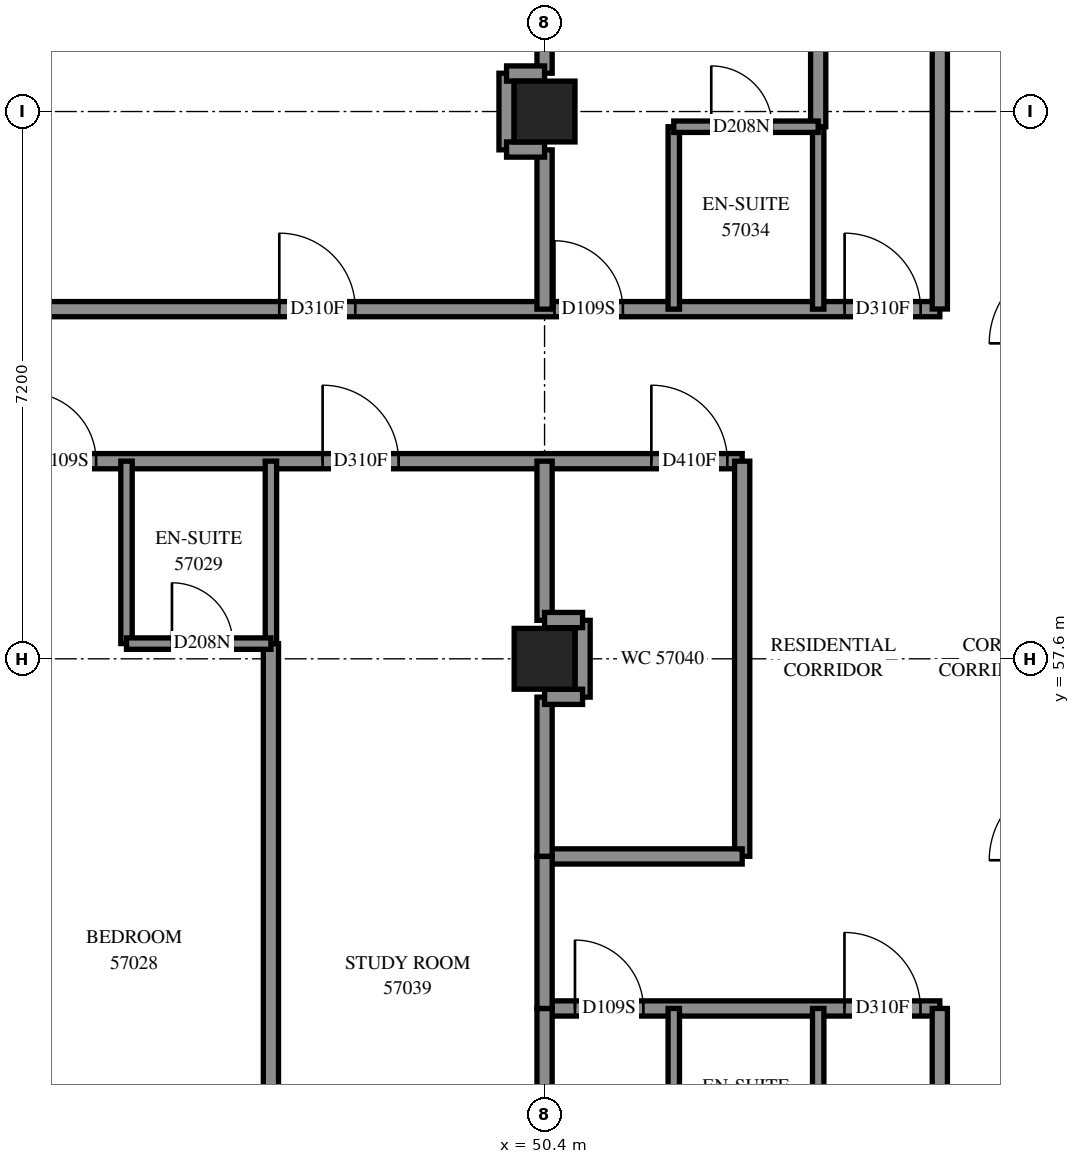
"""IFC4 building model, lengths in metres.
Left out: names, types, materials, properties, quantities, classifications, styles, units other than length and angle.
Written with IfcOpenShell. Run it as: python <this file> out.ifc"""

import sys

from ifc_helpers import new_model, si_unit, direction, frame, frame_2d, origin, origin_2d, place, context, subcontext, project, spatial, rectangle, extrude, element, fill, save


model = new_model("IFC4")
c1 = context("Model", 3, precision=1e-05, world=origin(), true_north=direction((0.0, 1.0)))
c2 = subcontext(c1, "Body", "Model", "MODEL_VIEW")
j1 = project(units=[si_unit("LENGTHUNIT", "METRE"), si_unit("PLANEANGLEUNIT", "RADIAN")], contexts=[c1])
p1 = place(None, origin())
s1 = spatial("IfcSite", under=j1, at=p1, CompositionType="ELEMENT")
p2 = place(p1, origin())
s2 = spatial("IfcBuilding", under=s1, at=p2, CompositionType="ELEMENT")
p3 = place(p2, frame((0.0, 0.0, 210.0)))
s3 = spatial("IfcBuildingStorey", under=s2, at=p3, CompositionType="ELEMENT", Elevation=210.0)
for number, where, z_axis, x_axis in (
    (1, (50.4, 57.6, 0.0), (0.0, 0.0, 1.0), (1.0, 0.0, 0.0)),
    (2, (50.4, 64.8, 0.0), (0.0, 0.0, 1.0), (1.0, 0.0, 0.0)),
):
    element("IfcColumn", number, at=place(p3, frame(where, z_axis=z_axis, x_axis=x_axis)), inside=s3, PredefinedType="COLUMN", context=c2, shape_type="SweptSolid", body=[
        extrude(rectangle(XDim=0.8, YDim=0.8, at=origin_2d()), origin(), (0.0, 0.0, 1.0), 3.1),
    ])
p4 = place(p3, frame((36.0, 60.2, 0.0), z_axis=(0.0, 0.0, 1.0), x_axis=(1.0, 0.0, 0.0)))
e3 = element("IfcWall", 3, at=p4, inside=s3, PredefinedType="PARTITIONING", context=c2, shape_type="SweptSolid", body=[
    extrude(rectangle(XDim=17.0, YDim=0.2, at=frame_2d((8.5, 0.0))), origin(), (0.0, 0.0, 1.0), 3.1),
])
p5 = place(p4, frame((4.125, 0.0, 0.0)))
e4 = element("IfcOpeningElement", 4, at=p5, cuts=e3, PredefinedType="OPENING", context=c2, shape_type="SweptSolid", body=[
    extrude(rectangle(XDim=1.0, YDim=2.1, at=frame_2d((0.5, 1.05))), frame((0.0, 0.11, 0.0), z_axis=(0.0, -1.0, 0.0), x_axis=(1.0, 0.0, 0.0)), (0.0, 0.0, 1.0), 0.22),
])
p6 = place(p4, frame((7.6, 0.0, 0.0)))
e5 = element("IfcOpeningElement", 5, at=p6, cuts=e3, PredefinedType="OPENING", context=c2, shape_type="SweptSolid", body=[
    extrude(rectangle(XDim=0.9, YDim=2.1, at=frame_2d((0.45, 1.05))), frame((0.0, 0.11, 0.0), z_axis=(0.0, -1.0, 0.0), x_axis=(1.0, 0.0, 0.0)), (0.0, 0.0, 1.0), 0.22),
])
p7 = place(p4, frame((11.48, 0.0, 0.0)))
e6 = element("IfcOpeningElement", 6, at=p7, cuts=e3, PredefinedType="OPENING", context=c2, shape_type="SweptSolid", body=[
    extrude(rectangle(XDim=1.0, YDim=2.1, at=frame_2d((0.5, 1.05))), frame((0.0, 0.11, 0.0), z_axis=(0.0, -1.0, 0.0), x_axis=(1.0, 0.0, 0.0)), (0.0, 0.0, 1.0), 0.22),
])
p8 = place(p4, frame((15.805, 0.0, 0.0)))
e7 = element("IfcOpeningElement", 7, at=p8, cuts=e3, PredefinedType="OPENING", context=c2, shape_type="SweptSolid", body=[
    extrude(rectangle(XDim=1.0, YDim=2.1, at=frame_2d((0.5, 1.05))), frame((0.0, 0.11, 0.0), z_axis=(0.0, -1.0, 0.0), x_axis=(1.0, 0.0, 0.0)), (0.0, 0.0, 1.0), 0.22),
])
p9 = place(p3, frame((40.602, 62.2, 0.0), z_axis=(0.0, 0.0, 1.0), x_axis=(1.0, 0.0, 0.0)))
e8 = element("IfcWall", 8, at=p9, inside=s3, PredefinedType="PARTITIONING", context=c2, shape_type="SweptSolid", body=[
    extrude(rectangle(XDim=14.998, YDim=0.2, at=frame_2d((7.499, 0.0))), origin(), (0.0, 0.0, 1.0), 3.1),
])
p10 = place(p9, frame((6.308, 0.0, 0.0)))
e9 = element("IfcOpeningElement", 9, at=p10, cuts=e8, PredefinedType="OPENING", context=c2, shape_type="SweptSolid", body=[
    extrude(rectangle(XDim=1.0, YDim=2.1, at=frame_2d((0.5, 1.05))), frame((0.0, 0.11, 0.0), z_axis=(0.0, -1.0, 0.0), x_axis=(1.0, 0.0, 0.0)), (0.0, 0.0, 1.0), 0.22),
])
p11 = place(p9, frame((9.928, 0.0, 0.0)))
e10 = element("IfcOpeningElement", 10, at=p11, cuts=e8, PredefinedType="OPENING", context=c2, shape_type="SweptSolid", body=[
    extrude(rectangle(XDim=0.9, YDim=2.1, at=frame_2d((0.45, 1.05))), frame((0.0, 0.11, 0.0), z_axis=(0.0, -1.0, 0.0), x_axis=(1.0, 0.0, 0.0)), (0.0, 0.0, 1.0), 0.22),
])
p12 = place(p9, frame((13.746, 0.0, 0.0)))
e11 = element("IfcOpeningElement", 11, at=p12, cuts=e8, PredefinedType="OPENING", context=c2, shape_type="SweptSolid", body=[
    extrude(rectangle(XDim=1.0, YDim=2.1, at=frame_2d((0.5, 1.05))), frame((0.0, 0.11, 0.0), z_axis=(0.0, -1.0, 0.0), x_axis=(1.0, 0.0, 0.0)), (0.0, 0.0, 1.0), 0.22),
])
p13 = place(p3, frame((54.0, 64.6, 0.0), z_axis=(0.0, 0.0, 1.0), x_axis=(0.0, 1.0, 0.0)))
e12 = element("IfcWall", 12, at=p13, inside=s3, PredefinedType="PARTITIONING", context=c2, shape_type="SweptSolid", body=[
    extrude(rectangle(XDim=8.18, YDim=0.2, at=frame_2d((4.09, 0.0))), origin(), (0.0, 0.0, 1.0), 3.1),
])
p14 = place(p3, frame((46.8, 49.7, 0.0), z_axis=(0.0, 0.0, 1.0), x_axis=(0.0, 1.0, 0.0)))
e13 = element("IfcWall", 13, at=p14, inside=s3, PredefinedType="PARTITIONING", context=c2, shape_type="SweptSolid", body=[
    extrude(rectangle(XDim=8.1, YDim=0.2, at=frame_2d((4.05, 0.0))), origin(), (0.0, 0.0, 1.0), 3.1),
])
p15 = place(p3, frame((50.4, 65.304, 0.0), z_axis=(0.0, 0.0, 1.0), x_axis=(0.0, 1.0, 0.0)))
e14 = element("IfcWall", 14, at=p15, inside=s3, PredefinedType="PARTITIONING", context=c2, shape_type="SweptSolid", body=[
    extrude(rectangle(XDim=6.192, YDim=0.2, at=frame_2d((3.096, 0.0))), origin(), (0.0, 0.0, 1.0), 3.1),
])
p16 = place(p3, frame((50.4, 53.0, 0.0), z_axis=(0.0, 0.0, 1.0), x_axis=(1.0, 0.0, 0.0)))
e15 = element("IfcWall", 15, at=p16, inside=s3, PredefinedType="PARTITIONING", context=c2, shape_type="SweptSolid", body=[
    extrude(rectangle(XDim=5.2, YDim=0.2, at=frame_2d((2.6, 0.0))), origin(), (0.0, 0.0, 1.0), 3.1),
])
p17 = place(p16, frame((0.4, 0.0, 0.0)))
e16 = element("IfcOpeningElement", 16, at=p17, cuts=e15, PredefinedType="OPENING", context=c2, shape_type="SweptSolid", body=[
    extrude(rectangle(XDim=0.9, YDim=2.1, at=frame_2d((0.45, 1.05))), frame((0.0, 0.11, 0.0), z_axis=(0.0, -1.0, 0.0), x_axis=(1.0, 0.0, 0.0)), (0.0, 0.0, 1.0), 0.22),
])
p18 = place(p16, frame((3.946, 0.0, 0.0)))
e17 = element("IfcOpeningElement", 17, at=p18, cuts=e15, PredefinedType="OPENING", context=c2, shape_type="SweptSolid", body=[
    extrude(rectangle(XDim=1.0, YDim=2.1, at=frame_2d((0.5, 1.05))), frame((0.0, 0.11, 0.0), z_axis=(0.0, -1.0, 0.0), x_axis=(1.0, 0.0, 0.0)), (0.0, 0.0, 1.0), 0.22),
])
p19 = place(p3, frame((53.0, 55.002, 0.0), z_axis=(0.0, 0.0, 1.0), x_axis=(0.0, 1.0, 0.0)))
e18 = element("IfcWall", 18, at=p19, inside=s3, PredefinedType="PARTITIONING", context=c2, shape_type="SweptSolid", body=[
    extrude(rectangle(XDim=5.198, YDim=0.2, at=frame_2d((2.599, 0.0))), origin(), (0.0, 0.0, 1.0), 3.1),
])
p20 = place(p3, frame((55.6, 48.4, 0.0), z_axis=(0.0, 0.0, 1.0), x_axis=(0.0, 1.0, 0.0)))
e19 = element("IfcWall", 19, at=p20, inside=s3, PredefinedType="PARTITIONING", context=c2, shape_type="SweptSolid", body=[
    extrude(rectangle(XDim=4.6, YDim=0.2, at=frame_2d((2.3, 0.0))), origin(), (0.0, 0.0, 1.0), 3.1),
])
p21 = place(p3, frame((55.6, 62.202, 0.0), z_axis=(0.0, 0.0, 1.0), x_axis=(0.0, 1.0, 0.0)))
e20 = element("IfcWall", 20, at=p21, inside=s3, PredefinedType="PARTITIONING", context=c2, shape_type="SweptSolid", body=[
    extrude(rectangle(XDim=4.598, YDim=0.2, at=frame_2d((2.299, 0.0))), origin(), (0.0, 0.0, 1.0), 3.1),
])
p22 = place(p3, frame((50.4, 55.0, 0.0), z_axis=(0.0, 0.0, 1.0), x_axis=(1.0, 0.0, 0.0)))
e21 = element("IfcWall", 21, at=p22, inside=s3, PredefinedType="PARTITIONING", context=c2, shape_type="SweptSolid", body=[
    extrude(rectangle(XDim=2.6, YDim=0.2, at=frame_2d((1.3, 0.0))), origin(), (0.0, 0.0, 1.0), 3.1),
])
for number, where, z_axis, x_axis in (
    (22, (44.9, 57.8, 0.0), (0.0, 0.0, 1.0), (0.0, 1.0, 0.0)),
    (23, (46.8, 57.8, 0.0), (0.0, 0.0, 1.0), (0.0, 1.0, 0.0)),
    (24, (52.1, 50.6, 0.0), (0.0, 0.0, 1.0), (0.0, 1.0, 0.0)),
    (25, (54.0, 50.6, 0.0), (0.0, 0.0, 1.0), (0.0, 1.0, 0.0)),
    (26, (52.1, 62.2, 0.0), (0.0, 0.0, 1.0), (0.0, 1.0, 0.0)),
    (27, (54.0, 62.2, 0.0), (0.0, 0.0, 1.0), (0.0, 1.0, 0.0)),
):
    element("IfcWall", number, at=place(p3, frame(where, z_axis=z_axis, x_axis=x_axis)), inside=s3, PredefinedType="PARTITIONING", context=c2, shape_type="SweptSolid", body=[
        extrude(rectangle(XDim=2.4, YDim=0.15, at=frame_2d((1.2, 0.0))), origin(), (0.0, 0.0, 1.0), 3.1),
    ])
p23 = place(p3, frame((50.4, 50.8, 0.0), z_axis=(0.0, 0.0, 1.0), x_axis=(0.0, 1.0, 0.0)))
e28 = element("IfcWall", 28, at=p23, inside=s3, PredefinedType="PARTITIONING", context=c2, shape_type="SweptSolid", body=[
    extrude(rectangle(XDim=2.2, YDim=0.2, at=frame_2d((1.1, 0.0))), origin(), (0.0, 0.0, 1.0), 3.1),
])
for number, where, z_axis, x_axis in (
    (29, (50.4, 62.2, 0.0), (0.0, 0.0, 1.0), (0.0, 1.0, 0.0)),
    (30, (50.4, 55.0, 0.0), (0.0, 0.0, 1.0), (0.0, 1.0, 0.0)),
):
    element("IfcWall", number, at=place(p3, frame(where, z_axis=z_axis, x_axis=x_axis)), inside=s3, PredefinedType="PARTITIONING", context=c2, shape_type="SweptSolid", body=[
        extrude(rectangle(XDim=2.096, YDim=0.2, at=frame_2d((1.048, 0.0))), origin(), (0.0, 0.0, 1.0), 3.1),
    ])
p24 = place(p3, frame((50.4, 58.106, 0.0), z_axis=(0.0, 0.0, 1.0), x_axis=(0.0, 1.0, 0.0)))
e31 = element("IfcWall", 31, at=p24, inside=s3, PredefinedType="PARTITIONING", context=c2, shape_type="SweptSolid", body=[
    extrude(rectangle(XDim=2.094, YDim=0.2, at=frame_2d((1.047, 0.0))), origin(), (0.0, 0.0, 1.0), 3.1),
])
p25 = place(p3, frame((50.4, 53.0, 0.0), z_axis=(0.0, 0.0, 1.0), x_axis=(0.0, 1.0, 0.0)))
e32 = element("IfcWall", 32, at=p25, inside=s3, PredefinedType="PARTITIONING", context=c2, shape_type="SweptSolid", body=[
    extrude(rectangle(XDim=2.0, YDim=0.2, at=frame_2d((1.0, 0.0))), origin(), (0.0, 0.0, 1.0), 3.1),
])
p26 = place(p3, frame((52.1, 64.6, 0.0), z_axis=(0.0, 0.0, 1.0), x_axis=(1.0, 0.0, 0.0)))
e33 = element("IfcWall", 33, at=p26, inside=s3, PredefinedType="PARTITIONING", context=c2, shape_type="SweptSolid", body=[
    extrude(rectangle(XDim=1.9, YDim=0.15, at=frame_2d((0.95, 0.0))), origin(), (0.0, 0.0, 1.0), 3.1),
])
p27 = place(p26, frame((0.493, 0.0, 0.0)))
e34 = element("IfcOpeningElement", 34, at=p27, cuts=e33, PredefinedType="OPENING", context=c2, shape_type="SweptSolid", body=[
    extrude(rectangle(XDim=0.8, YDim=2.1, at=frame_2d((0.4, 1.05))), frame((0.0, 0.085, 0.0), z_axis=(0.0, -1.0, 0.0), x_axis=(1.0, 0.0, 0.0)), (0.0, 0.0, 1.0), 0.17),
])
p28 = place(p3, frame((44.9, 57.8, 0.0), z_axis=(0.0, 0.0, 1.0), x_axis=(1.0, 0.0, 0.0)))
e35 = element("IfcWall", 35, at=p28, inside=s3, PredefinedType="PARTITIONING", context=c2, shape_type="SweptSolid", body=[
    extrude(rectangle(XDim=1.9, YDim=0.15, at=frame_2d((0.95, 0.0))), origin(), (0.0, 0.0, 1.0), 3.1),
])
p29 = place(p28, frame((0.598, 0.0, 0.0)))
e36 = element("IfcOpeningElement", 36, at=p29, cuts=e35, PredefinedType="OPENING", context=c2, shape_type="SweptSolid", body=[
    extrude(rectangle(XDim=0.8, YDim=2.1, at=frame_2d((0.4, 1.05))), frame((0.0, 0.085, 0.0), z_axis=(0.0, -1.0, 0.0), x_axis=(1.0, 0.0, 0.0)), (0.0, 0.0, 1.0), 0.17),
])
p30 = place(p3, frame((50.9, 57.096, 0.0), z_axis=(0.0, 0.0, 1.0), x_axis=(0.0, 1.0, 0.0)))
e37 = element("IfcWall", 37, at=p30, inside=s3, PredefinedType="PARTITIONING", context=c2, shape_type="SweptSolid", body=[
    extrude(rectangle(XDim=1.01, YDim=0.2, at=frame_2d((0.505, 0.0))), origin(), (0.0, 0.0, 1.0), 3.1),
])
p31 = place(p3, frame((49.9, 64.296, 0.0), z_axis=(0.0, 0.0, 1.0), x_axis=(0.0, 1.0, 0.0)))
e38 = element("IfcWall", 38, at=p31, inside=s3, PredefinedType="PARTITIONING", context=c2, shape_type="SweptSolid", body=[
    extrude(rectangle(XDim=1.008, YDim=0.2, at=frame_2d((0.504, 0.0))), origin(), (0.0, 0.0, 1.0), 3.1),
])
for number, where, z_axis, x_axis in (
    (39, (49.9, 65.3, 0.0), (0.0, 0.0, 1.0), (1.0, 0.0, 0.0)),
    (40, (49.9, 64.3, 0.0), (0.0, 0.0, 1.0), (1.0, 0.0, 0.0)),
    (41, (50.4, 58.11, 0.0), (0.0, 0.0, 1.0), (1.0, 0.0, 0.0)),
    (42, (50.4, 57.1, 0.0), (0.0, 0.0, 1.0), (1.0, 0.0, 0.0)),
):
    element("IfcWall", number, at=place(p3, frame(where, z_axis=z_axis, x_axis=x_axis)), inside=s3, PredefinedType="PARTITIONING", context=c2, shape_type="SweptSolid", body=[
        extrude(rectangle(XDim=0.5, YDim=0.2, at=frame_2d((0.25, 0.0))), origin(), (0.0, 0.0, 1.0), 3.1),
    ])
p32 = place(p6, origin())
e43 = element("IfcDoor", 43, at=p32, inside=s3, OperationType="SINGLE_SWING_LEFT", PredefinedType="DOOR", context=c2, shape_type="SweptSolid", body=[
    extrude(rectangle(XDim=0.9, YDim=2.1, at=frame_2d((0.45, 1.05))), frame((0.0, 0.025, 0.0), z_axis=(0.0, -1.0, 0.0), x_axis=(1.0, 0.0, 0.0)), (0.0, 0.0, 1.0), 0.05),
])
fill(e5, e43)
p33 = place(p29, origin())
e44 = element("IfcDoor", 44, at=p33, inside=s3, OperationType="SINGLE_SWING_RIGHT", PredefinedType="DOOR", context=c2, shape_type="SweptSolid", body=[
    extrude(rectangle(XDim=0.8, YDim=2.1, at=frame_2d((0.4, 1.05))), frame((0.0, 0.025, 0.0), z_axis=(0.0, -1.0, 0.0), x_axis=(1.0, 0.0, 0.0)), (0.0, 0.0, 1.0), 0.05),
])
fill(e36, e44)
p34 = place(p10, origin())
e45 = element("IfcDoor", 45, at=p34, inside=s3, OperationType="SINGLE_SWING_RIGHT", PredefinedType="DOOR", context=c2, shape_type="SweptSolid", body=[
    extrude(rectangle(XDim=1.0, YDim=2.1, at=frame_2d((0.5, 1.05))), frame((0.0, 0.025, 0.0), z_axis=(0.0, -1.0, 0.0), x_axis=(1.0, 0.0, 0.0)), (0.0, 0.0, 1.0), 0.05),
])
fill(e9, e45)
p35 = place(p11, origin())
e46 = element("IfcDoor", 46, at=p35, inside=s3, OperationType="SINGLE_SWING_RIGHT", PredefinedType="DOOR", context=c2, shape_type="SweptSolid", body=[
    extrude(rectangle(XDim=0.9, YDim=2.1, at=frame_2d((0.45, 1.05))), frame((0.0, 0.025, 0.0), z_axis=(0.0, -1.0, 0.0), x_axis=(1.0, 0.0, 0.0)), (0.0, 0.0, 1.0), 0.05),
])
fill(e10, e46)
p36 = place(p27, origin())
e47 = element("IfcDoor", 47, at=p36, inside=s3, OperationType="SINGLE_SWING_RIGHT", PredefinedType="DOOR", context=c2, shape_type="SweptSolid", body=[
    extrude(rectangle(XDim=0.8, YDim=2.1, at=frame_2d((0.4, 1.05))), frame((0.0, 0.025, 0.0), z_axis=(0.0, -1.0, 0.0), x_axis=(1.0, 0.0, 0.0)), (0.0, 0.0, 1.0), 0.05),
])
fill(e34, e47)
p37 = place(p12, origin())
e48 = element("IfcDoor", 48, at=p37, inside=s3, OperationType="SINGLE_SWING_LEFT", PredefinedType="DOOR", context=c2, shape_type="SweptSolid", body=[
    extrude(rectangle(XDim=1.0, YDim=2.1, at=frame_2d((0.5, 1.05))), frame((0.0, 0.025, 0.0), z_axis=(0.0, -1.0, 0.0), x_axis=(1.0, 0.0, 0.0)), (0.0, 0.0, 1.0), 0.05),
])
fill(e11, e48)
p38 = place(p7, origin())
e49 = element("IfcDoor", 49, at=p38, inside=s3, OperationType="SINGLE_SWING_RIGHT", PredefinedType="DOOR", context=c2, shape_type="SweptSolid", body=[
    extrude(rectangle(XDim=1.0, YDim=2.1, at=frame_2d((0.5, 1.05))), frame((0.0, 0.025, 0.0), z_axis=(0.0, -1.0, 0.0), x_axis=(1.0, 0.0, 0.0)), (0.0, 0.0, 1.0), 0.05),
])
fill(e6, e49)
p39 = place(p8, origin())
e50 = element("IfcDoor", 50, at=p39, inside=s3, OperationType="SINGLE_SWING_LEFT", PredefinedType="DOOR", context=c2, shape_type="SweptSolid", body=[
    extrude(rectangle(XDim=1.0, YDim=2.1, at=frame_2d((0.5, 1.05))), frame((0.0, 0.025, 0.0), z_axis=(0.0, -1.0, 0.0), x_axis=(1.0, 0.0, 0.0)), (0.0, 0.0, 1.0), 0.05),
])
fill(e7, e50)
p40 = place(p17, origin())
e51 = element("IfcDoor", 51, at=p40, inside=s3, OperationType="SINGLE_SWING_LEFT", PredefinedType="DOOR", context=c2, shape_type="SweptSolid", body=[
    extrude(rectangle(XDim=0.9, YDim=2.1, at=frame_2d((0.45, 1.05))), frame((0.0, 0.025, 0.0), z_axis=(0.0, -1.0, 0.0), x_axis=(1.0, 0.0, 0.0)), (0.0, 0.0, 1.0), 0.05),
])
fill(e16, e51)
p41 = place(p18, origin())
e52 = element("IfcDoor", 52, at=p41, inside=s3, OperationType="SINGLE_SWING_RIGHT", PredefinedType="DOOR", context=c2, shape_type="SweptSolid", body=[
    extrude(rectangle(XDim=1.0, YDim=2.1, at=frame_2d((0.5, 1.05))), frame((0.0, 0.025, 0.0), z_axis=(0.0, -1.0, 0.0), x_axis=(1.0, 0.0, 0.0)), (0.0, 0.0, 1.0), 0.05),
])
fill(e17, e52)
save(model, sys.argv[1])
